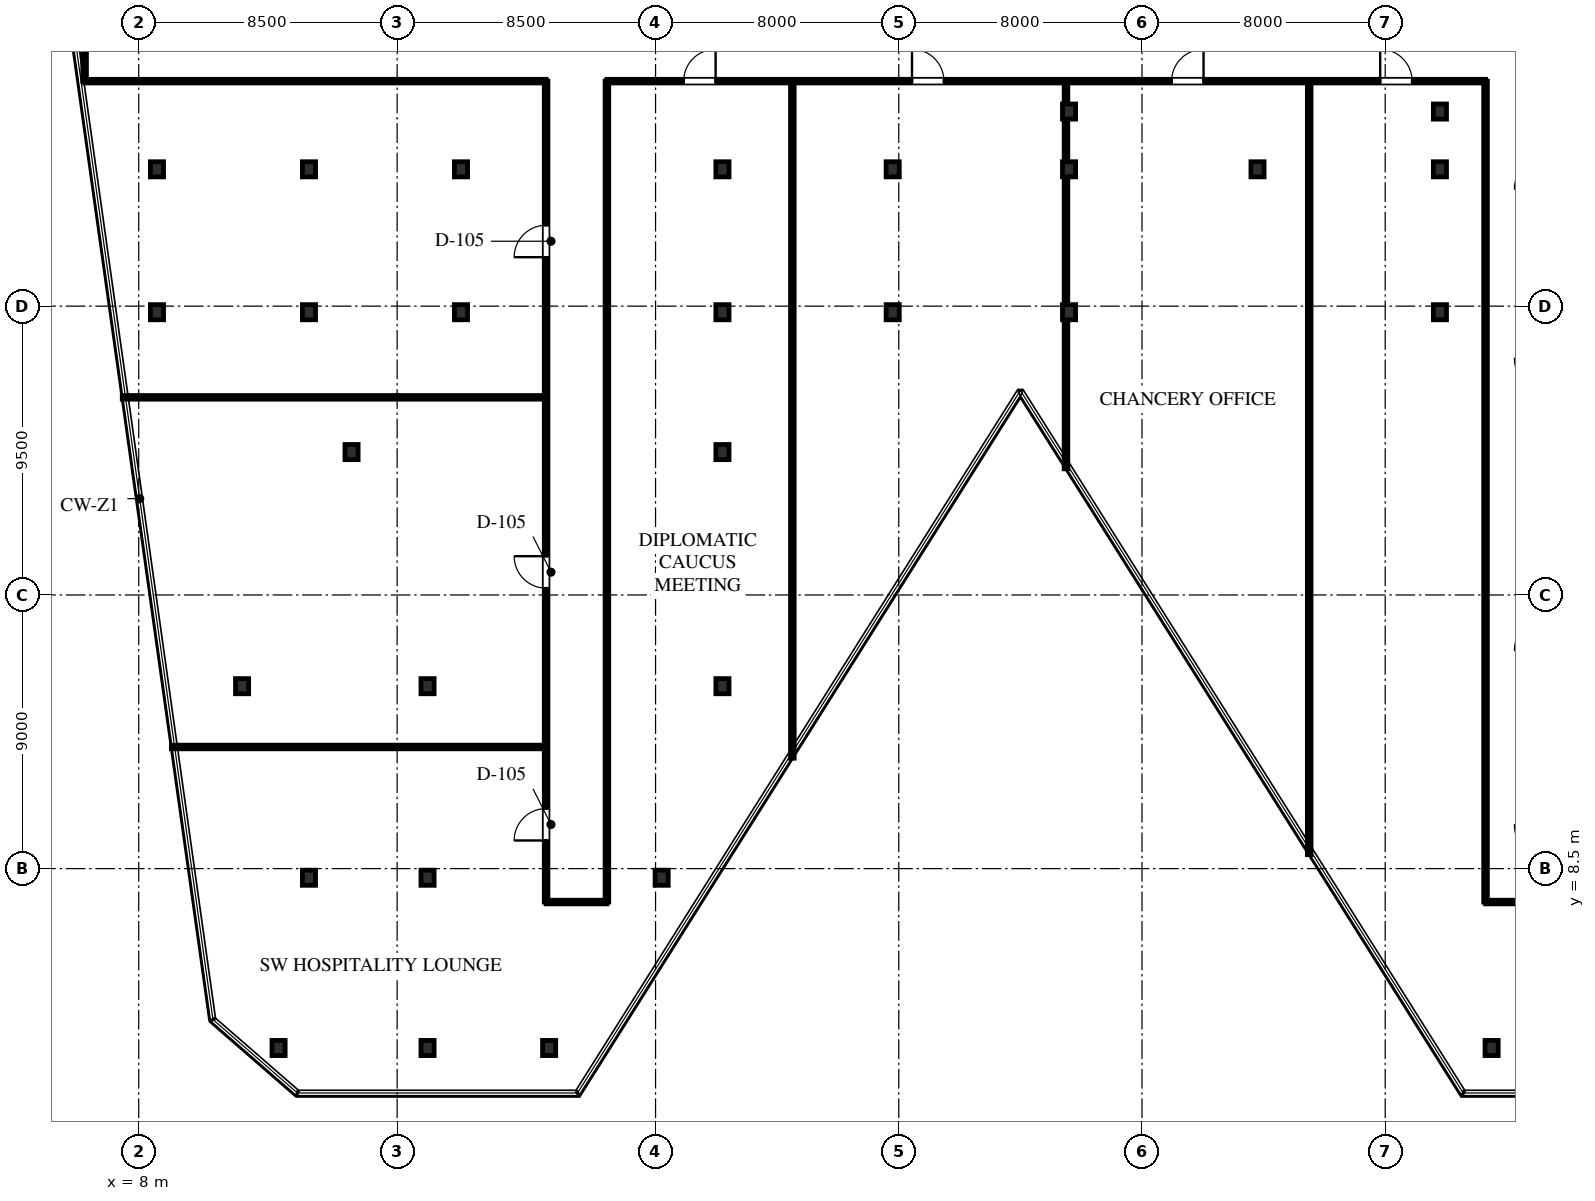
"""IFC4 building model, lengths in metres.
Left out: names, types, materials, properties, quantities, classifications, styles, units other than length and angle.
Written with IfcOpenShell. Run it as: python <this file> out.ifc"""

import sys

from ifc_helpers import new_model, si_unit, direction, frame, frame_2d, origin, origin_2d, place, context, subcontext, project, spatial, rectangle, i_section, extrude, element, fill, save


model = new_model("IFC4")
c1 = context("Model", 3, precision=1e-05, world=origin(), true_north=direction((0.0, 1.0)))
c2 = subcontext(c1, "Body", "Model", "MODEL_VIEW")
j1 = project(units=[si_unit("LENGTHUNIT", "METRE"), si_unit("PLANEANGLEUNIT", "RADIAN")], contexts=[c1])
p1 = place(None, origin())
s1 = spatial("IfcSite", under=j1, at=p1, CompositionType="ELEMENT")
p2 = place(p1, origin())
s2 = spatial("IfcBuilding", under=s1, at=p2, CompositionType="ELEMENT")
p3 = place(p2, frame((0.0, 0.0, 69.5)))
s3 = spatial("IfcBuildingStorey", under=s2, at=p3, CompositionType="ELEMENT", Elevation=69.5)
for number, where, z_axis, x_axis in (
    (1, (12.6, 2.6, 0.0), (0.0, 0.0, 1.0), (1.0, 0.0, 0.0)),
    (2, (15.0, 22.2, 0.0), (0.0, 0.0, 1.0), (1.0, 0.0, 0.0)),
    (3, (27.2, 22.2, 0.0), (0.0, 0.0, 1.0), (1.0, 0.0, 0.0)),
    (4, (8.6, 26.8, 0.0), (0.0, 0.0, 1.0), (1.0, 0.0, 0.0)),
    (5, (13.6, 26.8, 0.0), (0.0, 0.0, 1.0), (1.0, 0.0, 0.0)),
    (6, (18.6, 26.8, 0.0), (0.0, 0.0, 1.0), (1.0, 0.0, 0.0)),
    (7, (27.2, 26.8, 0.0), (0.0, 0.0, 1.0), (1.0, 0.0, 0.0)),
    (8, (32.8, 26.8, 0.0), (0.0, 0.0, 1.0), (1.0, 0.0, 0.0)),
    (9, (38.6, 26.8, 0.0), (0.0, 0.0, 1.0), (1.0, 0.0, 0.0)),
    (10, (50.8, 26.8, 0.0), (0.0, 0.0, 1.0), (1.0, 0.0, 0.0)),
    (11, (8.6, 31.5, 0.0), (0.0, 0.0, 1.0), (1.0, 0.0, 0.0)),
    (12, (13.6, 31.5, 0.0), (0.0, 0.0, 1.0), (1.0, 0.0, 0.0)),
    (13, (17.5, 2.6, 0.0), (0.0, 0.0, 1.0), (1.0, 0.0, 0.0)),
    (14, (18.6, 31.5, 0.0), (0.0, 0.0, 1.0), (1.0, 0.0, 0.0)),
    (15, (27.2, 31.5, 0.0), (0.0, 0.0, 1.0), (1.0, 0.0, 0.0)),
    (16, (32.8, 31.5, 0.0), (0.0, 0.0, 1.0), (1.0, 0.0, 0.0)),
    (17, (38.6, 31.5, 0.0), (0.0, 0.0, 1.0), (1.0, 0.0, 0.0)),
    (18, (44.8, 31.5, 0.0), (0.0, 0.0, 1.0), (1.0, 0.0, 0.0)),
    (19, (50.8, 31.5, 0.0), (0.0, 0.0, 1.0), (1.0, 0.0, 0.0)),
    (20, (21.5, 2.6, 0.0), (0.0, 0.0, 1.0), (1.0, 0.0, 0.0)),
    (21, (52.5, 2.6, 0.0), (0.0, 0.0, 1.0), (1.0, 0.0, 0.0)),
    (22, (13.6, 8.2, 0.0), (0.0, 0.0, 1.0), (1.0, 0.0, 0.0)),
    (23, (17.5, 8.2, 0.0), (0.0, 0.0, 1.0), (1.0, 0.0, 0.0)),
    (24, (25.2, 8.2, 0.0), (0.0, 0.0, 1.0), (1.0, 0.0, 0.0)),
    (25, (11.4, 14.5, 0.0), (0.0, 0.0, 1.0), (1.0, 0.0, 0.0)),
    (26, (17.5, 14.5, 0.0), (0.0, 0.0, 1.0), (1.0, 0.0, 0.0)),
    (27, (27.2, 14.5, 0.0), (0.0, 0.0, 1.0), (1.0, 0.0, 0.0)),
    (28, (38.6, 33.4, 0.0), (0.0, 0.0, 1.0), (1.0, 0.0, 0.0)),
    (29, (50.8, 33.4, 0.0), (0.0, 0.0, 1.0), (1.0, 0.0, 0.0)),
):
    element("IfcColumn", number, at=place(p3, frame(where, z_axis=z_axis, x_axis=x_axis)), inside=s3, PredefinedType="COLUMN", context=c2, shape_type="SweptSolid", body=[
        extrude(i_section(OverallWidth=0.432, OverallDepth=0.498, WebThickness=0.056, FlangeThickness=0.089, FilletRadius=0.03, at=origin_2d()), origin(), (0.0, 0.0, 1.0), 4.0),
    ])
p4 = place(p3, frame((6.22, 34.4, 0.0), z_axis=(0.0, 0.0, 1.0), x_axis=(1.0, 0.0, 0.0)))
e30 = element("IfcWall", 30, at=p4, inside=s3, PredefinedType="PARTITIONING", context=c2, shape_type="SweptSolid", body=[
    extrude(rectangle(XDim=15.18, YDim=0.12, at=frame_2d((7.59, 0.0))), origin(), (0.0, 0.0, 1.0), 2.813),
])
p5 = place(p3, frame((23.4, 34.4, 0.0), z_axis=(0.0, 0.0, 1.0), x_axis=(1.0, 0.0, 0.0)))
e31 = element("IfcWall", 31, at=p5, inside=s3, PredefinedType="PARTITIONING", context=c2, shape_type="SweptSolid", body=[
    extrude(rectangle(XDim=28.9, YDim=0.12, at=frame_2d((14.45, 0.0))), origin(), (0.0, 0.0, 1.0), 2.813),
])
p6 = place(p5, frame((2.525, 0.0, 0.0)))
e32 = element("IfcOpeningElement", 32, at=p6, cuts=e31, PredefinedType="OPENING", context=c2, shape_type="SweptSolid", body=[
    extrude(rectangle(XDim=1.05, YDim=2.2, at=frame_2d((0.525, 1.1))), frame((0.0, 0.07, 0.0), z_axis=(0.0, -1.0, 0.0), x_axis=(1.0, 0.0, 0.0)), (0.0, 0.0, 1.0), 0.14),
])
p7 = place(p5, frame((10.035, 0.0, 0.0)))
e33 = element("IfcOpeningElement", 33, at=p7, cuts=e31, PredefinedType="OPENING", context=c2, shape_type="SweptSolid", body=[
    extrude(rectangle(XDim=1.05, YDim=2.2, at=frame_2d((0.525, 1.1))), frame((0.0, 0.07, 0.0), z_axis=(0.0, -1.0, 0.0), x_axis=(1.0, 0.0, 0.0)), (0.0, 0.0, 1.0), 0.14),
])
p8 = place(p5, frame((18.575, 0.0, 0.0)))
e34 = element("IfcOpeningElement", 34, at=p8, cuts=e31, PredefinedType="OPENING", context=c2, shape_type="SweptSolid", body=[
    extrude(rectangle(XDim=1.05, YDim=2.2, at=frame_2d((0.525, 1.1))), frame((0.0, 0.07, 0.0), z_axis=(0.0, -1.0, 0.0), x_axis=(1.0, 0.0, 0.0)), (0.0, 0.0, 1.0), 0.14),
])
p9 = place(p5, frame((25.435, 0.0, 0.0)))
e35 = element("IfcOpeningElement", 35, at=p9, cuts=e31, PredefinedType="OPENING", context=c2, shape_type="SweptSolid", body=[
    extrude(rectangle(XDim=1.05, YDim=2.2, at=frame_2d((0.525, 1.1))), frame((0.0, 0.07, 0.0), z_axis=(0.0, -1.0, 0.0), x_axis=(1.0, 0.0, 0.0)), (0.0, 0.0, 1.0), 0.14),
])
p10 = place(p3, frame((6.22, 34.4, 0.0), z_axis=(0.0, 0.0, 1.0), x_axis=(0.0, 1.0, 0.0)))
e36 = element("IfcWall", 36, at=p10, inside=s3, PredefinedType="PARTITIONING", context=c2, shape_type="SweptSolid", body=[
    extrude(rectangle(XDim=3.65, YDim=0.12, at=frame_2d((1.825, 0.0))), origin(), (0.0, 0.0, 1.0), 3.74),
])
p11 = place(p3, frame((21.4, 7.4, 0.0), z_axis=(0.0, 0.0, 1.0), x_axis=(0.0, 1.0, 0.0)))
e37 = element("IfcWall", 37, at=p11, inside=s3, PredefinedType="PARTITIONING", context=c2, shape_type="SweptSolid", body=[
    extrude(rectangle(XDim=27.0, YDim=0.12, at=frame_2d((13.5, 0.0))), origin(), (0.0, 0.0, 1.0), 2.813),
])
p12 = place(p11, frame((2.025, 0.0, 0.0)))
e38 = element("IfcOpeningElement", 38, at=p12, cuts=e37, PredefinedType="OPENING", context=c2, shape_type="SweptSolid", body=[
    extrude(rectangle(XDim=1.05, YDim=2.2, at=frame_2d((0.525, 1.1))), frame((0.0, 0.07, 0.0), z_axis=(0.0, -1.0, 0.0), x_axis=(1.0, 0.0, 0.0)), (0.0, 0.0, 1.0), 0.14),
])
p13 = place(p11, frame((10.325, 0.0, 0.0)))
e39 = element("IfcOpeningElement", 39, at=p13, cuts=e37, PredefinedType="OPENING", context=c2, shape_type="SweptSolid", body=[
    extrude(rectangle(XDim=1.05, YDim=2.2, at=frame_2d((0.525, 1.1))), frame((0.0, 0.07, 0.0), z_axis=(0.0, -1.0, 0.0), x_axis=(1.0, 0.0, 0.0)), (0.0, 0.0, 1.0), 0.14),
])
p14 = place(p11, frame((21.21, 0.0, 0.0)))
e40 = element("IfcOpeningElement", 40, at=p14, cuts=e37, PredefinedType="OPENING", context=c2, shape_type="SweptSolid", body=[
    extrude(rectangle(XDim=1.05, YDim=2.2, at=frame_2d((0.525, 1.1))), frame((0.0, 0.07, 0.0), z_axis=(0.0, -1.0, 0.0), x_axis=(1.0, 0.0, 0.0)), (0.0, 0.0, 1.0), 0.14),
])
p15 = place(p3, frame((23.4, 7.4, 0.0), z_axis=(0.0, 0.0, 1.0), x_axis=(0.0, 1.0, 0.0)))
e41 = element("IfcWall", 41, at=p15, inside=s3, PredefinedType="PARTITIONING", context=c2, shape_type="SweptSolid", body=[
    extrude(rectangle(XDim=27.0, YDim=0.12, at=frame_2d((13.5, 0.0))), origin(), (0.0, 0.0, 1.0), 2.813),
])
p16 = place(p3, frame((21.4, 7.4, 0.0), z_axis=(0.0, 0.0, 1.0), x_axis=(1.0, 0.0, 0.0)))
e42 = element("IfcWall", 42, at=p16, inside=s3, PredefinedType="PARTITIONING", context=c2, shape_type="SweptSolid", body=[
    extrude(rectangle(XDim=2.0, YDim=0.12, at=frame_2d((1.0, 0.0))), origin(), (0.0, 0.0, 1.0), 2.978),
])
p17 = place(p3, frame((52.3, 7.4, 0.0), z_axis=(0.0, 0.0, 1.0), x_axis=(0.0, 1.0, 0.0)))
e43 = element("IfcWall", 43, at=p17, inside=s3, PredefinedType="PARTITIONING", context=c2, shape_type="SweptSolid", body=[
    extrude(rectangle(XDim=27.0, YDim=0.12, at=frame_2d((13.5, 0.0))), origin(), (0.0, 0.0, 1.0), 2.813),
])
p18 = place(p3, frame((52.3, 7.4, 0.0), z_axis=(0.0, 0.0, 1.0), x_axis=(1.0, 0.0, 0.0)))
e44 = element("IfcWall", 44, at=p18, inside=s3, PredefinedType="PARTITIONING", context=c2, shape_type="SweptSolid", body=[
    extrude(rectangle(XDim=2.0, YDim=0.12, at=frame_2d((1.0, 0.0))), origin(), (0.0, 0.0, 1.0), 2.978),
])
p19 = place(p3, frame((9.075, 12.5, 0.0), z_axis=(0.0, 0.0, 1.0), x_axis=(1.0, 0.0, 0.0)))
e45 = element("IfcWall", 45, at=p19, inside=s3, PredefinedType="PARTITIONING", context=c2, shape_type="SweptSolid", body=[
    extrude(rectangle(XDim=12.257, YDim=0.12, at=frame_2d((6.129, 0.0))), origin(), (0.0, 0.0, 1.0), 2.813),
])
p20 = place(p3, frame((7.458, 24.0, 0.0), z_axis=(0.0, 0.0, 1.0), x_axis=(1.0, 0.0, 0.0)))
e46 = element("IfcWall", 46, at=p20, inside=s3, PredefinedType="PARTITIONING", context=c2, shape_type="SweptSolid", body=[
    extrude(rectangle(XDim=13.874, YDim=0.12, at=frame_2d((6.937, 0.0))), origin(), (0.0, 0.0, 1.0), 2.978),
])
p21 = place(p3, frame((29.5, 12.132, 0.0), z_axis=(0.0, 0.0, 1.0), x_axis=(0.0, 1.0, 0.0)))
e47 = element("IfcWall", 47, at=p21, inside=s3, PredefinedType="PARTITIONING", context=c2, shape_type="SweptSolid", body=[
    extrude(rectangle(XDim=22.2, YDim=0.12, at=frame_2d((11.1, 0.0))), origin(), (0.0, 0.0, 1.0), 2.813),
])
p22 = place(p3, frame((38.5, 21.649, 0.0), z_axis=(0.0, 0.0, 1.0), x_axis=(0.0, 1.0, 0.0)))
e48 = element("IfcWall", 48, at=p22, inside=s3, PredefinedType="PARTITIONING", context=c2, shape_type="SweptSolid", body=[
    extrude(rectangle(XDim=12.683, YDim=0.12, at=frame_2d((6.342, 0.0))), origin(), (0.0, 0.0, 1.0), 2.813),
])
p23 = place(p3, frame((46.5, 8.959, 0.0), z_axis=(0.0, 0.0, 1.0), x_axis=(0.0, 1.0, 0.0)))
e49 = element("IfcWall", 49, at=p23, inside=s3, PredefinedType="PARTITIONING", context=c2, shape_type="SweptSolid", body=[
    extrude(rectangle(XDim=25.373, YDim=0.12, at=frame_2d((12.687, 0.0))), origin(), (0.0, 0.0, 1.0), 2.813),
])
p24 = place(p12, origin())
e50 = element("IfcDoor", 50, at=p24, inside=s3, OperationType="SINGLE_SWING_LEFT", PredefinedType="DOOR", context=c2, shape_type="SweptSolid", body=[
    extrude(rectangle(XDim=1.05, YDim=2.2, at=frame_2d((0.525, 1.1))), frame((0.0, 0.025, 0.0), z_axis=(0.0, -1.0, 0.0), x_axis=(1.0, 0.0, 0.0)), (0.0, 0.0, 1.0), 0.05),
])
fill(e38, e50)
p25 = place(p13, origin())
e51 = element("IfcDoor", 51, at=p25, inside=s3, OperationType="SINGLE_SWING_RIGHT", PredefinedType="DOOR", context=c2, shape_type="SweptSolid", body=[
    extrude(rectangle(XDim=1.05, YDim=2.2, at=frame_2d((0.525, 1.1))), frame((0.0, 0.025, 0.0), z_axis=(0.0, -1.0, 0.0), x_axis=(1.0, 0.0, 0.0)), (0.0, 0.0, 1.0), 0.05),
])
fill(e39, e51)
p26 = place(p14, origin())
e52 = element("IfcDoor", 52, at=p26, inside=s3, OperationType="SINGLE_SWING_LEFT", PredefinedType="DOOR", context=c2, shape_type="SweptSolid", body=[
    extrude(rectangle(XDim=1.05, YDim=2.2, at=frame_2d((0.525, 1.1))), frame((0.0, 0.025, 0.0), z_axis=(0.0, -1.0, 0.0), x_axis=(1.0, 0.0, 0.0)), (0.0, 0.0, 1.0), 0.05),
])
fill(e40, e52)
p27 = place(p6, origin())
e53 = element("IfcDoor", 53, at=p27, inside=s3, OperationType="SINGLE_SWING_RIGHT", PredefinedType="DOOR", context=c2, shape_type="SweptSolid", body=[
    extrude(rectangle(XDim=1.05, YDim=2.2, at=frame_2d((0.525, 1.1))), frame((0.0, 0.025, 0.0), z_axis=(0.0, -1.0, 0.0), x_axis=(1.0, 0.0, 0.0)), (0.0, 0.0, 1.0), 0.05),
])
fill(e32, e53)
p28 = place(p7, origin())
e54 = element("IfcDoor", 54, at=p28, inside=s3, OperationType="SINGLE_SWING_LEFT", PredefinedType="DOOR", context=c2, shape_type="SweptSolid", body=[
    extrude(rectangle(XDim=1.05, YDim=2.2, at=frame_2d((0.525, 1.1))), frame((0.0, 0.025, 0.0), z_axis=(0.0, -1.0, 0.0), x_axis=(1.0, 0.0, 0.0)), (0.0, 0.0, 1.0), 0.05),
])
fill(e33, e54)
p29 = place(p8, origin())
e55 = element("IfcDoor", 55, at=p29, inside=s3, OperationType="SINGLE_SWING_RIGHT", PredefinedType="DOOR", context=c2, shape_type="SweptSolid", body=[
    extrude(rectangle(XDim=1.05, YDim=2.2, at=frame_2d((0.525, 1.1))), frame((0.0, 0.025, 0.0), z_axis=(0.0, -1.0, 0.0), x_axis=(1.0, 0.0, 0.0)), (0.0, 0.0, 1.0), 0.05),
])
fill(e34, e55)
p30 = place(p9, origin())
e56 = element("IfcDoor", 56, at=p30, inside=s3, OperationType="SINGLE_SWING_LEFT", PredefinedType="DOOR", context=c2, shape_type="SweptSolid", body=[
    extrude(rectangle(XDim=1.05, YDim=2.2, at=frame_2d((0.525, 1.1))), frame((0.0, 0.025, 0.0), z_axis=(0.0, -1.0, 0.0), x_axis=(1.0, 0.0, 0.0)), (0.0, 0.0, 1.0), 0.05),
])
fill(e35, e56)
save(model, sys.argv[1])
